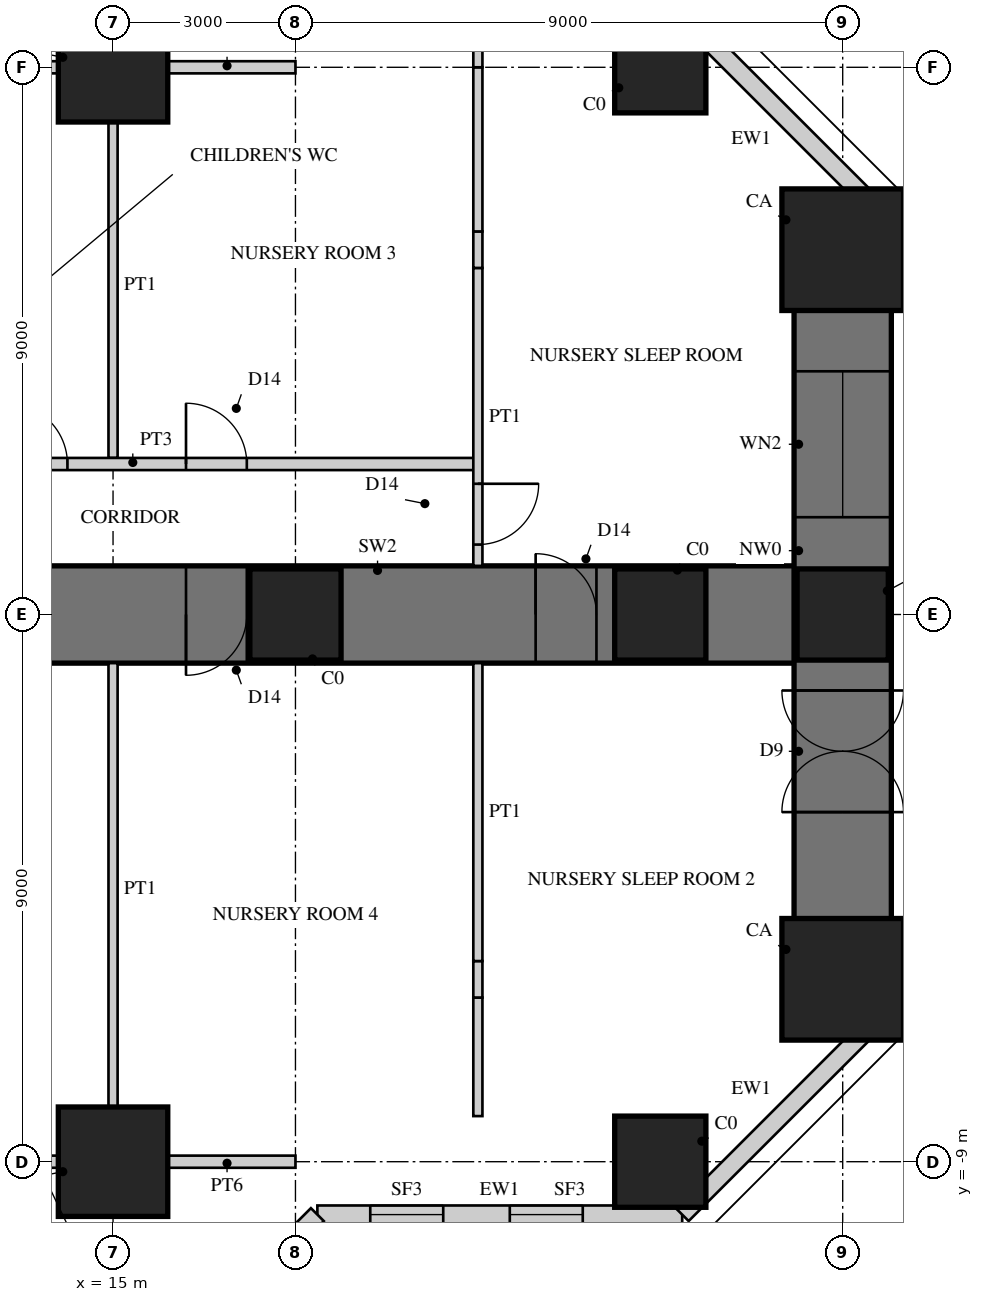
"""IFC4 building model, lengths in metres.
Left out: names, types, materials, properties, quantities, classifications, styles, units other than length and angle.
Written with IfcOpenShell. Run it as: python <this file> out.ifc"""

import sys

from ifc_helpers import new_model, si_unit, direction, frame, frame_2d, origin, origin_2d, place, context, subcontext, project, spatial, rectangle, hollow_rectangle, extrude, element, fill, save


model = new_model("IFC4")
c1 = context("Model", 3, precision=1e-05, world=origin(), true_north=direction((0.0, 1.0)))
c2 = subcontext(c1, "Body", "Model", "MODEL_VIEW")
j1 = project(units=[si_unit("LENGTHUNIT", "METRE"), si_unit("PLANEANGLEUNIT", "RADIAN")], contexts=[c1])
p1 = place(None, origin())
s1 = spatial("IfcSite", under=j1, at=p1, CompositionType="ELEMENT")
p2 = place(p1, origin())
s2 = spatial("IfcBuilding", under=s1, at=p2, CompositionType="ELEMENT")
p3 = place(p2, origin())
s3 = spatial("IfcBuildingStorey", under=s2, at=p3, CompositionType="ELEMENT", Elevation=0.0)
p4 = place(p3, frame((9.0, 0.0, 0.0), z_axis=(0.0, 0.0, 1.0), x_axis=(1.0, 0.0, 0.0)))
e1 = element("IfcWall", 1, at=p4, inside=s3, PredefinedType="SHEAR", context=c2, shape_type="SweptSolid", body=[
    extrude(rectangle(XDim=18.0, YDim=1.6, at=frame_2d((9.0, 0.0))), origin(), (0.0, 0.0, 1.0), 5.0),
])
p5 = place(p4, frame((1.85, 0.0, 0.0)))
e2 = element("IfcOpeningElement", 2, at=p5, cuts=e1, PredefinedType="OPENING", context=c2, shape_type="SweptSolid", body=[
    extrude(rectangle(XDim=1.0, YDim=2.2, at=frame_2d((0.5, 1.1))), frame((0.0, 0.81, 0.0), z_axis=(0.0, -1.0, 0.0), x_axis=(1.0, 0.0, 0.0)), (0.0, 0.0, 1.0), 1.62),
])
p6 = place(p4, frame((7.2, 0.0, 0.0)))
e3 = element("IfcOpeningElement", 3, at=p6, cuts=e1, PredefinedType="OPENING", context=c2, shape_type="SweptSolid", body=[
    extrude(rectangle(XDim=1.0, YDim=2.2, at=frame_2d((0.5, 1.1))), frame((0.0, 0.81, 0.0), z_axis=(0.0, -1.0, 0.0), x_axis=(1.0, 0.0, 0.0)), (0.0, 0.0, 1.0), 1.62),
])
p7 = place(p4, frame((12.95, 0.0, 0.0)))
e4 = element("IfcOpeningElement", 4, at=p7, cuts=e1, PredefinedType="OPENING", context=c2, shape_type="SweptSolid", body=[
    extrude(rectangle(XDim=1.0, YDim=2.2, at=frame_2d((0.5, 1.1))), frame((0.0, 0.81, 0.0), z_axis=(0.0, -1.0, 0.0), x_axis=(1.0, 0.0, 0.0)), (0.0, 0.0, 1.0), 1.62),
])
p8 = place(p3, frame((27.0, -6.0, 0.0), z_axis=(0.0, 0.0, 1.0), x_axis=(0.0, 1.0, 0.0)))
e5 = element("IfcWall", 5, at=p8, inside=s3, PredefinedType="SHEAR", context=c2, shape_type="SweptSolid", body=[
    extrude(rectangle(XDim=12.0, YDim=1.6, at=frame_2d((6.0, 0.0))), origin(), (0.0, 0.0, 1.0), 5.0),
])
p9 = place(p8, frame((2.75, 0.0, 0.0)))
e6 = element("IfcOpeningElement", 6, at=p9, cuts=e5, PredefinedType="OPENING", context=c2, shape_type="SweptSolid", body=[
    extrude(rectangle(XDim=2.0, YDim=2.6, at=frame_2d((1.0, 1.3))), frame((0.0, 0.81, 0.0), z_axis=(0.0, -1.0, 0.0), x_axis=(1.0, 0.0, 0.0)), (0.0, 0.0, 1.0), 1.62),
])
p10 = place(p8, frame((7.6, 0.0, 0.6)))
e7 = element("IfcOpeningElement", 7, at=p10, cuts=e5, PredefinedType="OPENING", context=c2, shape_type="SweptSolid", body=[
    extrude(rectangle(XDim=2.4, YDim=3.0, at=frame_2d((1.2, 1.5))), frame((0.0, 0.81, 0.0), z_axis=(0.0, -1.0, 0.0), x_axis=(1.0, 0.0, 0.0)), (0.0, 0.0, 1.0), 1.62),
])
p11 = place(p3, frame((15.0, -9.0, 0.0), z_axis=(0.0, 0.0, 1.0), x_axis=(1.0, 0.0, 0.0)))
e8 = element("IfcColumn", 8, at=p11, inside=s3, PredefinedType="COLUMN", context=c2, shape_type="SweptSolid", body=[
    extrude(rectangle(XDim=1.8, YDim=1.8, at=origin_2d()), origin(), (0.0, 0.0, 1.0), 5.0),
])
p12 = place(p3, frame((24.0, -9.0, 0.0), z_axis=(0.0, 0.0, 1.0), x_axis=(1.0, 0.0, 0.0)))
e9 = element("IfcColumn", 9, at=p12, inside=s3, PredefinedType="COLUMN", context=c2, shape_type="SweptSolid", body=[
    extrude(rectangle(XDim=1.5, YDim=1.5, at=origin_2d()), origin(), (0.0, 0.0, 1.0), 5.0),
])
p13 = place(p3, frame((15.0, 9.0, 0.0), z_axis=(0.0, 0.0, 1.0), x_axis=(1.0, 0.0, 0.0)))
e10 = element("IfcColumn", 10, at=p13, inside=s3, PredefinedType="COLUMN", context=c2, shape_type="SweptSolid", body=[
    extrude(rectangle(XDim=1.8, YDim=1.8, at=origin_2d()), origin(), (0.0, 0.0, 1.0), 5.0),
])
p14 = place(p3, frame((24.0, 9.0, 0.0), z_axis=(0.0, 0.0, 1.0), x_axis=(1.0, 0.0, 0.0)))
e11 = element("IfcColumn", 11, at=p14, inside=s3, PredefinedType="COLUMN", context=c2, shape_type="SweptSolid", body=[
    extrude(rectangle(XDim=1.5, YDim=1.5, at=origin_2d()), origin(), (0.0, 0.0, 1.0), 5.0),
])
p15 = place(p3, frame((27.0, -6.0, 0.0), z_axis=(0.0, 0.0, 1.0), x_axis=(1.0, 0.0, 0.0)))
e12 = element("IfcColumn", 12, at=p15, inside=s3, PredefinedType="COLUMN", context=c2, shape_type="SweptSolid", body=[
    extrude(rectangle(XDim=2.0, YDim=2.0, at=origin_2d()), origin(), (0.0, 0.0, 1.0), 5.0),
])
p16 = place(p3, frame((27.0, 0.0, 0.0), z_axis=(0.0, 0.0, 1.0), x_axis=(1.0, 0.0, 0.0)))
e13 = element("IfcColumn", 13, at=p16, inside=s3, PredefinedType="COLUMN", context=c2, shape_type="SweptSolid", body=[
    extrude(rectangle(XDim=1.5, YDim=1.5, at=origin_2d()), origin(), (0.0, 0.0, 1.0), 5.0),
])
p17 = place(p3, frame((27.0, 6.0, 0.0), z_axis=(0.0, 0.0, 1.0), x_axis=(1.0, 0.0, 0.0)))
e14 = element("IfcColumn", 14, at=p17, inside=s3, PredefinedType="COLUMN", context=c2, shape_type="SweptSolid", body=[
    extrude(rectangle(XDim=2.0, YDim=2.0, at=origin_2d()), origin(), (0.0, 0.0, 1.0), 5.0),
])
for number, where, z_axis, x_axis in (
    (15, (18.0, 0.0, 0.0), (0.0, 0.0, 1.0), (1.0, 0.0, 0.0)),
    (16, (24.0, 0.0, 0.0), (0.0, 0.0, 1.0), (1.0, 0.0, 0.0)),
):
    element("IfcColumn", number, at=place(p3, frame(where, z_axis=z_axis, x_axis=x_axis)), inside=s3, PredefinedType="COLUMN", context=c2, shape_type="SweptSolid", body=[
        extrude(rectangle(XDim=1.5, YDim=1.5, at=origin_2d()), origin(), (0.0, 0.0, 1.0), 5.0),
    ])
p18 = place(p3, frame((18.36, -9.87, 0.0), z_axis=(0.0, 0.0, 1.0), x_axis=(1.0, 0.0, 0.0)))
e17 = element("IfcWall", 17, at=p18, inside=s3, PredefinedType="SOLIDWALL", context=c2, shape_type="SweptSolid", body=[
    extrude(rectangle(XDim=6.0, YDim=0.3, at=frame_2d((3.0, 0.0))), origin(), (0.0, 0.0, 1.0), 4.8),
])
p19 = place(p18, frame((0.87, 0.0, 0.3)))
e18 = element("IfcOpeningElement", 18, at=p19, cuts=e17, PredefinedType="OPENING", context=c2, shape_type="SweptSolid", body=[
    extrude(rectangle(XDim=1.2, YDim=3.9, at=frame_2d((0.6, 1.95))), frame((0.0, 0.16, 0.0), z_axis=(0.0, -1.0, 0.0), x_axis=(1.0, 0.0, 0.0)), (0.0, 0.0, 1.0), 0.32),
])
p20 = place(p18, frame((3.165, 0.0, 0.3)))
e19 = element("IfcOpeningElement", 19, at=p20, cuts=e17, PredefinedType="OPENING", context=c2, shape_type="SweptSolid", body=[
    extrude(rectangle(XDim=1.2, YDim=3.9, at=frame_2d((0.6, 1.95))), frame((0.0, 0.16, 0.0), z_axis=(0.0, -1.0, 0.0), x_axis=(1.0, 0.0, 0.0)), (0.0, 0.0, 1.0), 0.32),
])
for number, where, z_axis, x_axis in (
    (20, (24.36, -9.87, 0.0), (0.0, 0.0, 1.0), (0.707, 0.707, 0.0)),
    (21, (27.8, 6.43, 0.0), (0.0, 0.0, 1.0), (-0.707, 0.707, 0.0)),
):
    element("IfcWall", number, at=place(p3, frame(where, z_axis=z_axis, x_axis=x_axis)), inside=s3, PredefinedType="SOLIDWALL", context=c2, shape_type="SweptSolid", body=[
        extrude(rectangle(XDim=4.865, YDim=0.3, at=frame_2d((2.432, 0.0))), origin(), (0.0, 0.0, 1.0), 4.8),
    ])
p21 = place(p3, frame((9.87, -18.36, 0.0), z_axis=(0.0, 0.0, 1.0), x_axis=(0.707106781187, 0.707106781187, 0.0)))
e22 = element("IfcWall", 22, at=p21, inside=s3, PredefinedType="SOLIDWALL", context=c2, shape_type="SweptSolid", body=[
    extrude(rectangle(XDim=12.007, YDim=0.3, at=frame_2d((6.003, 0.0))), origin(), (0.0, 0.0, 1.0), 4.8),
])
p22 = place(p21, frame((1.034, 0.0, 0.3)))
e23 = element("IfcOpeningElement", 23, at=p22, cuts=e22, PredefinedType="OPENING", context=c2, shape_type="SweptSolid", body=[
    extrude(rectangle(XDim=3.6, YDim=3.9, at=frame_2d((1.8, 1.95))), frame((0.0, 0.16, 0.0), z_axis=(0.0, -1.0, 0.0), x_axis=(1.0, 0.0, 0.0)), (0.0, 0.0, 1.0), 0.32),
])
p23 = place(p21, frame((7.169, 0.0, 0.3)))
e24 = element("IfcOpeningElement", 24, at=p23, cuts=e22, PredefinedType="OPENING", context=c2, shape_type="SweptSolid", body=[
    extrude(rectangle(XDim=1.2, YDim=3.9, at=frame_2d((0.6, 1.95))), frame((0.0, 0.16, 0.0), z_axis=(0.0, -1.0, 0.0), x_axis=(1.0, 0.0, 0.0)), (0.0, 0.0, 1.0), 0.32),
])
p24 = place(p21, frame((9.702, 0.0, 0.3)))
e25 = element("IfcOpeningElement", 25, at=p24, cuts=e22, PredefinedType="OPENING", context=c2, shape_type="SweptSolid", body=[
    extrude(rectangle(XDim=1.2, YDim=3.9, at=frame_2d((0.6, 1.95))), frame((0.0, 0.16, 0.0), z_axis=(0.0, -1.0, 0.0), x_axis=(1.0, 0.0, 0.0)), (0.0, 0.0, 1.0), 0.32),
])
p25 = place(p3, frame((15.0, 2.575, 0.0), z_axis=(0.0, 0.0, 1.0), x_axis=(0.0, 1.0, 0.0)))
e26 = element("IfcWall", 26, at=p25, inside=s3, PredefinedType="PARTITIONING", context=c2, shape_type="SweptSolid", body=[
    extrude(rectangle(XDim=5.675, YDim=0.15, at=frame_2d((2.837, 0.0))), origin(), (0.0, 0.0, 1.0), 3.85),
])
p26 = place(p3, frame((15.0, -8.25, 0.0), z_axis=(0.0, 0.0, 1.0), x_axis=(0.0, 1.0, 0.0)))
e27 = element("IfcWall", 27, at=p26, inside=s3, PredefinedType="PARTITIONING", context=c2, shape_type="SweptSolid", body=[
    extrude(rectangle(XDim=7.45, YDim=0.15, at=frame_2d((3.725, 0.0))), origin(), (0.0, 0.0, 1.0), 3.85),
])
p27 = place(p3, frame((9.65, 2.475, 0.0), z_axis=(0.0, 0.0, 1.0), x_axis=(1.0, 0.0, 0.0)))
e28 = element("IfcWall", 28, at=p27, inside=s3, PredefinedType="SOLIDWALL", context=c2, shape_type="SweptSolid", body=[
    extrude(rectangle(XDim=11.35, YDim=0.2, at=frame_2d((5.675, 0.0))), origin(), (0.0, 0.0, 1.0), 4.8),
])
p28 = place(p27, frame((1.2, 0.0, 0.0)))
e29 = element("IfcOpeningElement", 29, at=p28, cuts=e28, PredefinedType="OPENING", context=c2, shape_type="SweptSolid", body=[
    extrude(rectangle(XDim=1.0, YDim=2.2, at=frame_2d((0.5, 1.1))), frame((0.0, 0.11, 0.0), z_axis=(0.0, -1.0, 0.0), x_axis=(1.0, 0.0, 0.0)), (0.0, 0.0, 1.0), 0.22),
])
p29 = place(p27, frame((3.6, 0.0, 0.0)))
e30 = element("IfcOpeningElement", 30, at=p29, cuts=e28, PredefinedType="OPENING", context=c2, shape_type="SweptSolid", body=[
    extrude(rectangle(XDim=1.0, YDim=2.2, at=frame_2d((0.5, 1.1))), frame((0.0, 0.11, 0.0), z_axis=(0.0, -1.0, 0.0), x_axis=(1.0, 0.0, 0.0)), (0.0, 0.0, 1.0), 0.22),
])
p30 = place(p27, frame((6.55, 0.0, 0.0)))
e31 = element("IfcOpeningElement", 31, at=p30, cuts=e28, PredefinedType="OPENING", context=c2, shape_type="SweptSolid", body=[
    extrude(rectangle(XDim=1.0, YDim=2.2, at=frame_2d((0.5, 1.1))), frame((0.0, 0.11, 0.0), z_axis=(0.0, -1.0, 0.0), x_axis=(1.0, 0.0, 0.0)), (0.0, 0.0, 1.0), 0.22),
])
p31 = place(p3, frame((21.0, -8.25, 0.0), z_axis=(0.0, 0.0, 1.0), x_axis=(0.0, 1.0, 0.0)))
e32 = element("IfcWall", 32, at=p31, inside=s3, PredefinedType="PARTITIONING", context=c2, shape_type="SweptSolid", body=[
    extrude(rectangle(XDim=1.95, YDim=0.15, at=frame_2d((0.975, 0.0))), origin(), (0.0, 0.0, 1.0), 3.85),
])
p32 = place(p3, frame((21.0, -6.3, 0.0), z_axis=(0.0, 0.0, 1.0), x_axis=(0.0, 1.0, 0.0)))
e33 = element("IfcWall", 33, at=p32, inside=s3, PredefinedType="PARTITIONING", context=c2, shape_type="SweptSolid", body=[
    extrude(rectangle(XDim=0.6, YDim=0.15, at=frame_2d((0.3, 0.0))), origin(), (0.0, 0.0, 1.0), 4.8),
])
p33 = place(p3, frame((21.0, -5.7, 0.0), z_axis=(0.0, 0.0, 1.0), x_axis=(0.0, 1.0, 0.0)))
e34 = element("IfcWall", 34, at=p33, inside=s3, PredefinedType="PARTITIONING", context=c2, shape_type="SweptSolid", body=[
    extrude(rectangle(XDim=4.9, YDim=0.15, at=frame_2d((2.45, 0.0))), origin(), (0.0, 0.0, 1.0), 3.85),
])
p34 = place(p3, frame((21.0, 0.8, 0.0), z_axis=(0.0, 0.0, 1.0), x_axis=(0.0, 1.0, 0.0)))
e35 = element("IfcWall", 35, at=p34, inside=s3, PredefinedType="PARTITIONING", context=c2, shape_type="SweptSolid", body=[
    extrude(rectangle(XDim=4.9, YDim=0.15, at=frame_2d((2.45, 0.0))), origin(), (0.0, 0.0, 1.0), 3.85),
])
p35 = place(p34, frame((0.35, 0.0, 0.0)))
e36 = element("IfcOpeningElement", 36, at=p35, cuts=e35, PredefinedType="OPENING", context=c2, shape_type="SweptSolid", body=[
    extrude(rectangle(XDim=1.0, YDim=2.2, at=frame_2d((0.5, 1.1))), frame((0.0, 0.085, 0.0), z_axis=(0.0, -1.0, 0.0), x_axis=(1.0, 0.0, 0.0)), (0.0, 0.0, 1.0), 0.17),
])
p36 = place(p3, frame((21.0, 5.7, 0.0), z_axis=(0.0, 0.0, 1.0), x_axis=(0.0, 1.0, 0.0)))
e37 = element("IfcWall", 37, at=p36, inside=s3, PredefinedType="PARTITIONING", context=c2, shape_type="SweptSolid", body=[
    extrude(rectangle(XDim=0.6, YDim=0.15, at=frame_2d((0.3, 0.0))), origin(), (0.0, 0.0, 1.0), 4.8),
])
p37 = place(p3, frame((21.0, 6.3, 0.0), z_axis=(0.0, 0.0, 1.0), x_axis=(0.0, 1.0, 0.0)))
e38 = element("IfcWall", 38, at=p37, inside=s3, PredefinedType="PARTITIONING", context=c2, shape_type="SweptSolid", body=[
    extrude(rectangle(XDim=2.7, YDim=0.15, at=frame_2d((1.35, 0.0))), origin(), (0.0, 0.0, 1.0), 3.85),
])
p38 = place(p3, frame((21.0, 9.0, 0.0), z_axis=(0.0, 0.0, 1.0), x_axis=(0.0, 1.0, 0.0)))
e39 = element("IfcWall", 39, at=p38, inside=s3, PredefinedType="PARTITIONING", context=c2, shape_type="SweptSolid", body=[
    extrude(rectangle(XDim=0.72, YDim=0.15, at=frame_2d((0.36, 0.0))), origin(), (0.0, 0.0, 1.0), 4.8),
])
p39 = place(p3, frame((9.65, 9.0, 0.0), z_axis=(0.0, 0.0, 1.0), x_axis=(1.0, 0.0, 0.0)))
e40 = element("IfcWall", 40, at=p39, inside=s3, PredefinedType="SOLIDWALL", context=c2, shape_type="SweptSolid", body=[
    extrude(rectangle(XDim=4.6, YDim=0.2, at=frame_2d((2.3, 0.0))), origin(), (0.0, 0.0, 1.0), 3.8),
])
p40 = place(p39, frame((1.2, 0.0, 0.0)))
e41 = element("IfcOpeningElement", 41, at=p40, cuts=e40, PredefinedType="OPENING", context=c2, shape_type="SweptSolid", body=[
    extrude(rectangle(XDim=1.0, YDim=2.2, at=frame_2d((0.5, 1.1))), frame((0.0, 0.11, 0.0), z_axis=(0.0, -1.0, 0.0), x_axis=(1.0, 0.0, 0.0)), (0.0, 0.0, 1.0), 0.22),
])
p41 = place(p3, frame((15.75, 9.0, 0.0), z_axis=(0.0, 0.0, 1.0), x_axis=(1.0, 0.0, 0.0)))
e42 = element("IfcWall", 42, at=p41, inside=s3, PredefinedType="SOLIDWALL", context=c2, shape_type="SweptSolid", body=[
    extrude(rectangle(XDim=2.25, YDim=0.2, at=frame_2d((1.125, 0.0))), origin(), (0.0, 0.0, 1.0), 3.8),
])
p42 = place(p3, frame((9.161, -9.069, 0.0), z_axis=(0.0, 0.0, 1.0), x_axis=(0.919138226556, -0.393935172945, 0.0)))
e43 = element("IfcWall", 43, at=p42, inside=s3, PredefinedType="PARTITIONING", context=c2, shape_type="SweptSolid", body=[
    extrude(rectangle(XDim=7.425, YDim=0.15, at=frame_2d((3.712, 0.0))), origin(), (0.0, 0.0, 1.0), 4.8),
])
p43 = place(p42, frame((1.225, 0.0, 0.0)))
e44 = element("IfcOpeningElement", 44, at=p43, cuts=e43, PredefinedType="OPENING", context=c2, shape_type="SweptSolid", body=[
    extrude(rectangle(XDim=1.0, YDim=2.2, at=frame_2d((0.5, 1.1))), frame((0.0, 0.085, 0.0), z_axis=(0.0, -1.0, 0.0), x_axis=(1.0, 0.0, 0.0)), (0.0, 0.0, 1.0), 0.17),
])
p44 = place(p3, frame((14.25, -9.0, 0.0), z_axis=(0.0, 0.0, 1.0), x_axis=(-1.0, 0.0, 0.0)))
e45 = element("IfcWall", 45, at=p44, inside=s3, PredefinedType="SOLIDWALL", context=c2, shape_type="SweptSolid", body=[
    extrude(rectangle(XDim=4.6, YDim=0.2, at=frame_2d((2.3, 0.0))), origin(), (0.0, 0.0, 1.0), 3.8),
])
p45 = place(p3, frame((18.0, -9.0, 0.0), z_axis=(0.0, 0.0, 1.0), x_axis=(-1.0, 0.0, 0.0)))
e46 = element("IfcWall", 46, at=p45, inside=s3, PredefinedType="SOLIDWALL", context=c2, shape_type="SweptSolid", body=[
    extrude(rectangle(XDim=2.25, YDim=0.2, at=frame_2d((1.125, 0.0))), origin(), (0.0, 0.0, 1.0), 3.8),
])
p46 = place(p19, origin())
e47 = element("IfcWindow", 47, at=p46, inside=s3, PartitioningType="SINGLE_PANEL", PredefinedType="WINDOW", context=c2, shape_type="SweptSolid", body=[
    extrude(hollow_rectangle(XDim=1.2, YDim=3.9, WallThickness=0.06, at=frame_2d((0.6, 1.95))), frame((0.0, 0.03, 0.0), z_axis=(0.0, -1.0, 0.0), x_axis=(1.0, 0.0, 0.0)), (0.0, 0.0, 1.0), 0.06),
    extrude(rectangle(XDim=1.079, YDim=3.779, at=frame_2d((0.6, 1.95))), frame((0.0, 0.03, 0.0), z_axis=(0.0, -1.0, 0.0), x_axis=(1.0, 0.0, 0.0)), (0.0, 0.0, 1.0), 0.06),
])
fill(e18, e47)
p47 = place(p20, origin())
e48 = element("IfcWindow", 48, at=p47, inside=s3, PartitioningType="SINGLE_PANEL", PredefinedType="WINDOW", context=c2, shape_type="SweptSolid", body=[
    extrude(hollow_rectangle(XDim=1.2, YDim=3.9, WallThickness=0.06, at=frame_2d((0.6, 1.95))), frame((0.0, 0.03, 0.0), z_axis=(0.0, -1.0, 0.0), x_axis=(1.0, 0.0, 0.0)), (0.0, 0.0, 1.0), 0.06),
    extrude(rectangle(XDim=1.079, YDim=3.779, at=frame_2d((0.6, 1.95))), frame((0.0, 0.03, 0.0), z_axis=(0.0, -1.0, 0.0), x_axis=(1.0, 0.0, 0.0)), (0.0, 0.0, 1.0), 0.06),
])
fill(e19, e48)
p48 = place(p9, origin())
e49 = element("IfcDoor", 49, at=p48, inside=s3, OperationType="DOUBLE_DOOR_DOUBLE_SWING", PredefinedType="DOOR", context=c2, shape_type="SweptSolid", body=[
    extrude(hollow_rectangle(XDim=2.0, YDim=2.6, WallThickness=0.06, at=frame_2d((1.0, 1.3))), frame((0.0, 0.025, 0.0), z_axis=(0.0, -1.0, 0.0), x_axis=(1.0, 0.0, 0.0)), (0.0, 0.0, 1.0), 0.05),
    extrude(rectangle(XDim=1.879, YDim=2.479, at=frame_2d((1.0, 1.3))), frame((0.0, 0.025, 0.0), z_axis=(0.0, -1.0, 0.0), x_axis=(1.0, 0.0, 0.0)), (0.0, 0.0, 1.0), 0.05),
])
fill(e6, e49)
p49 = place(p10, origin())
e50 = element("IfcWindow", 50, at=p49, inside=s3, PartitioningType="SINGLE_PANEL", PredefinedType="WINDOW", context=c2, shape_type="SweptSolid", body=[
    extrude(hollow_rectangle(XDim=2.4, YDim=3.0, WallThickness=0.06, at=frame_2d((1.2, 1.5))), frame((0.0, 0.03, 0.0), z_axis=(0.0, -1.0, 0.0), x_axis=(1.0, 0.0, 0.0)), (0.0, 0.0, 1.0), 0.06),
    extrude(rectangle(XDim=2.279, YDim=2.879, at=frame_2d((1.2, 1.5))), frame((0.0, 0.03, 0.0), z_axis=(0.0, -1.0, 0.0), x_axis=(1.0, 0.0, 0.0)), (0.0, 0.0, 1.0), 0.06),
])
fill(e7, e50)
p50 = place(p29, origin())
e51 = element("IfcDoor", 51, at=p50, inside=s3, OperationType="SINGLE_SWING_LEFT", PredefinedType="DOOR", context=c2, shape_type="SweptSolid", body=[
    extrude(rectangle(XDim=1.0, YDim=2.2, at=frame_2d((0.5, 1.1))), frame((0.0, 0.025, 0.0), z_axis=(0.0, -1.0, 0.0), x_axis=(1.0, 0.0, 0.0)), (0.0, 0.0, 1.0), 0.05),
])
fill(e30, e51)
p51 = place(p30, origin())
e52 = element("IfcDoor", 52, at=p51, inside=s3, OperationType="SINGLE_SWING_LEFT", PredefinedType="DOOR", context=c2, shape_type="SweptSolid", body=[
    extrude(rectangle(XDim=1.0, YDim=2.2, at=frame_2d((0.5, 1.1))), frame((0.0, 0.025, 0.0), z_axis=(0.0, -1.0, 0.0), x_axis=(1.0, 0.0, 0.0)), (0.0, 0.0, 1.0), 0.05),
])
fill(e31, e52)
p52 = place(p35, frame((1.0, 0.0, 0.0), z_axis=(0.0, 0.0, 1.0), x_axis=(-1.0, 0.0, 0.0)))
e53 = element("IfcDoor", 53, at=p52, inside=s3, OperationType="SINGLE_SWING_LEFT", PredefinedType="DOOR", context=c2, shape_type="SweptSolid", body=[
    extrude(rectangle(XDim=1.0, YDim=2.2, at=frame_2d((0.5, 1.1))), frame((0.0, 0.025, 0.0), z_axis=(0.0, -1.0, 0.0), x_axis=(1.0, 0.0, 0.0)), (0.0, 0.0, 1.0), 0.05),
])
fill(e36, e53)
p53 = place(p6, frame((1.0, 0.0, 0.0), z_axis=(0.0, 0.0, 1.0), x_axis=(-1.0, 0.0, 0.0)))
e54 = element("IfcDoor", 54, at=p53, inside=s3, OperationType="SINGLE_SWING_RIGHT", PredefinedType="DOOR", context=c2, shape_type="SweptSolid", body=[
    extrude(rectangle(XDim=1.0, YDim=2.2, at=frame_2d((0.5, 1.1))), frame((0.0, 0.025, 0.0), z_axis=(0.0, -1.0, 0.0), x_axis=(1.0, 0.0, 0.0)), (0.0, 0.0, 1.0), 0.05),
])
fill(e3, e54)
p54 = place(p7, origin())
e55 = element("IfcDoor", 55, at=p54, inside=s3, OperationType="SINGLE_SWING_LEFT", PredefinedType="DOOR", context=c2, shape_type="SweptSolid", body=[
    extrude(rectangle(XDim=1.0, YDim=2.2, at=frame_2d((0.5, 1.1))), frame((0.0, 0.025, 0.0), z_axis=(0.0, -1.0, 0.0), x_axis=(1.0, 0.0, 0.0)), (0.0, 0.0, 1.0), 0.05),
])
fill(e4, e55)
save(model, sys.argv[1])
